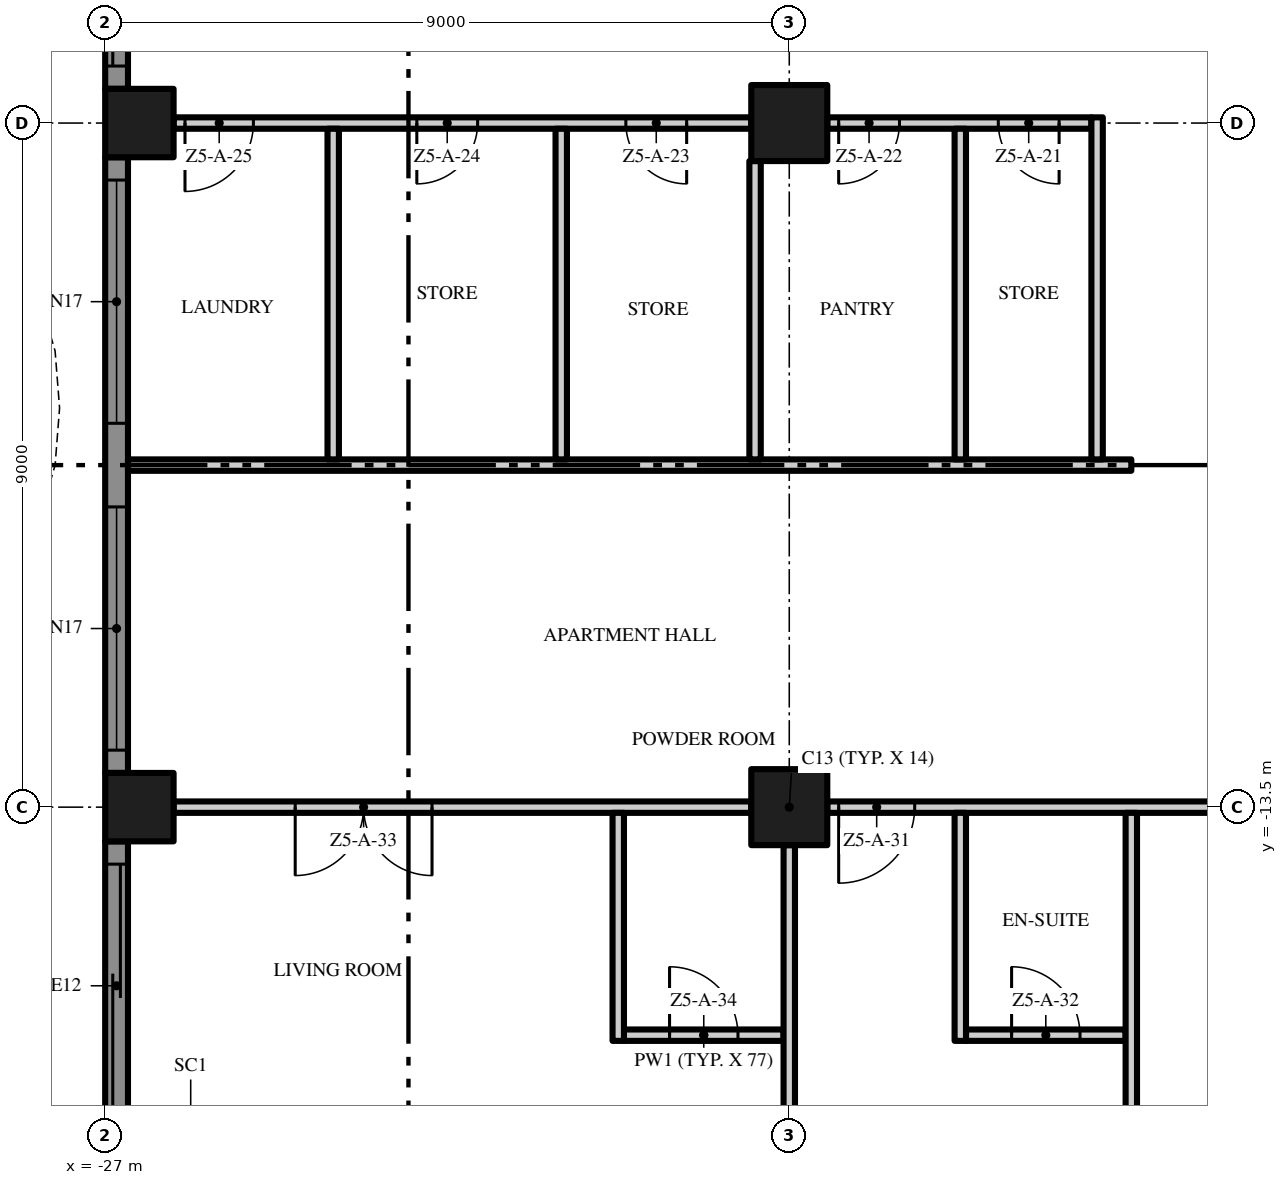
"""IFC4 building model, lengths in metres.
Left out: names, types, materials, properties, quantities, classifications, styles, units other than length and angle.
Written with IfcOpenShell. Run it as: python <this file> out.ifc"""

import sys

from ifc_helpers import new_model, si_unit, direction, frame, frame_2d, origin, origin_2d, place, context, subcontext, project, spatial, polyline, rectangle, outline, extrude, element, fill, save


model = new_model("IFC4")
c1 = context("Model", 3, precision=1e-05, world=origin(), true_north=direction((0.0, 1.0)))
c2 = subcontext(c1, "Body", "Model", "MODEL_VIEW")
j1 = project(units=[si_unit("LENGTHUNIT", "METRE"), si_unit("PLANEANGLEUNIT", "RADIAN")], contexts=[c1])
p1 = place(None, origin())
s1 = spatial("IfcSite", under=j1, at=p1, CompositionType="ELEMENT")
p2 = place(p1, origin())
s2 = spatial("IfcBuilding", under=s1, at=p2, CompositionType="ELEMENT")
p3 = place(p2, frame((0.0, 0.0, 242.6)))
s3 = spatial("IfcBuildingStorey", under=s2, at=p3, CompositionType="ELEMENT", Elevation=242.6)
for number, where, z_axis, x_axis in (
    (1, (-18.0, -13.5, 0.0), (0.0, 0.0, 1.0), (1.0, 0.0, 0.0)),
    (2, (-18.0, -4.5, 0.0), (0.0, 0.0, 1.0), (1.0, 0.0, 0.0)),
):
    element("IfcColumn", number, at=place(p3, frame(where, z_axis=z_axis, x_axis=x_axis)), inside=s3, PredefinedType="COLUMN", context=c2, shape_type="SweptSolid", body=[
        extrude(rectangle(XDim=1.0, YDim=1.0, at=origin_2d()), origin(), (0.0, 0.0, 1.0), 3.5),
    ])
for number, where, z_axis, x_axis in (
    (3, (-26.55, -13.5, 0.0), (0.0, 0.0, 1.0), (1.0, 0.0, 0.0)),
    (4, (-26.55, -4.5, 0.0), (0.0, 0.0, 1.0), (1.0, 0.0, 0.0)),
):
    element("IfcColumn", number, at=place(p3, frame(where, z_axis=z_axis, x_axis=x_axis)), inside=s3, PredefinedType="COLUMN", context=c2, shape_type="SweptSolid", body=[
        extrude(rectangle(XDim=0.9, YDim=0.9, at=origin_2d()), origin(), (0.0, 0.0, 1.0), 3.5),
    ])
p4 = place(p3, frame((-26.85, -4.05, 0.0), z_axis=(0.0, 0.0, 1.0), x_axis=(0.0, 1.0, 0.0)))
e5 = element("IfcWall", 5, at=p4, inside=s3, PredefinedType="SOLIDWALL", context=c2, shape_type="SweptSolid", body=[
    extrude(rectangle(XDim=8.1, YDim=0.3, at=frame_2d((4.05, 0.0))), origin(), (0.0, 0.0, 1.0), 3.5),
])
p5 = place(p4, frame((4.6, 0.0, 0.45)))
e6 = element("IfcOpeningElement", 6, at=p5, cuts=e5, PredefinedType="OPENING", context=c2, shape_type="SweptSolid", body=[
    extrude(rectangle(XDim=3.2, YDim=2.65, at=frame_2d((1.6, 1.325))), frame((0.0, 0.16, 0.0), z_axis=(0.0, -1.0, 0.0), x_axis=(1.0, 0.0, 0.0)), (0.0, 0.0, 1.0), 0.32),
])
p6 = place(p4, frame((0.3, 0.0, 0.0)))
e7 = element("IfcOpeningElement", 7, at=p6, cuts=e5, PredefinedType="OPENING", context=c2, shape_type="SweptSolid", body=[
    extrude(rectangle(XDim=3.2, YDim=2.4, at=frame_2d((1.6, 1.2))), frame((0.0, 0.16, 0.0), z_axis=(0.0, -1.0, 0.0), x_axis=(1.0, 0.0, 0.0)), (0.0, 0.0, 1.0), 0.32),
])
p7 = place(p3, frame((-26.85, -13.05, 0.0), z_axis=(0.0, 0.0, 1.0), x_axis=(0.0, 1.0, 0.0)))
e8 = element("IfcWall", 8, at=p7, inside=s3, PredefinedType="SOLIDWALL", context=c2, shape_type="SweptSolid", body=[
    extrude(rectangle(XDim=8.1, YDim=0.3, at=frame_2d((4.05, 0.0))), origin(), (0.0, 0.0, 1.0), 3.5),
])
p8 = place(p7, frame((4.6, 0.0, 0.45)))
e9 = element("IfcOpeningElement", 9, at=p8, cuts=e8, PredefinedType="OPENING", context=c2, shape_type="SweptSolid", body=[
    extrude(rectangle(XDim=3.2, YDim=2.65, at=frame_2d((1.6, 1.325))), frame((0.0, 0.16, 0.0), z_axis=(0.0, -1.0, 0.0), x_axis=(1.0, 0.0, 0.0)), (0.0, 0.0, 1.0), 0.32),
])
p9 = place(p7, frame((0.3, 0.0, 0.45)))
e10 = element("IfcOpeningElement", 10, at=p9, cuts=e8, PredefinedType="OPENING", context=c2, shape_type="SweptSolid", body=[
    extrude(rectangle(XDim=3.2, YDim=2.65, at=frame_2d((1.6, 1.325))), frame((0.0, 0.16, 0.0), z_axis=(0.0, -1.0, 0.0), x_axis=(1.0, 0.0, 0.0)), (0.0, 0.0, 1.0), 0.32),
])
p10 = place(p3, frame((-26.85, -18.0, 0.0), z_axis=(0.0, 0.0, 1.0), x_axis=(0.0, 1.0, 0.0)))
e11 = element("IfcWall", 11, at=p10, inside=s3, PredefinedType="SOLIDWALL", context=c2, shape_type="SweptSolid", body=[
    extrude(rectangle(XDim=4.05, YDim=0.3, at=frame_2d((2.025, 0.0))), origin(), (0.0, 0.0, 1.0), 3.5),
])
p11 = place(p10, frame((0.55, 0.0, 0.0)))
e12 = element("IfcOpeningElement", 12, at=p11, cuts=e11, PredefinedType="OPENING", context=c2, shape_type="SweptSolid", body=[
    extrude(rectangle(XDim=3.2, YDim=2.4, at=frame_2d((1.6, 1.2))), frame((0.0, 0.16, 0.0), z_axis=(0.0, -1.0, 0.0), x_axis=(1.0, 0.0, 0.0)), (0.0, 0.0, 1.0), 0.32),
])
p12 = place(p3, origin())
e13 = element("IfcWall", 13, at=p12, inside=s3, PredefinedType="USERDEFINED", context=c2, shape_type="SweptSolid", body=[
    extrude(outline(polyline([(-28.8, 18.0), (-29.505, 16.5), (-29.941, 15.0), (-30.0, 14.25), (-29.941, 13.5), (-29.505, 12.0), (-28.8, 10.5), (-28.095, 9.0), (-27.659, 7.5), (-27.6, 6.75), (-27.659, 6.0), (-28.095, 4.5), (-28.8, 3.0), (-29.505, 1.5), (-29.941, 0.0), (-30.0, -0.75), (-29.941, -1.5), (-29.505, -3.0), (-28.8, -4.5), (-28.095, -6.0), (-27.659, -7.5), (-27.6, -8.25), (-27.659, -9.0), (-28.095, -10.5), (-28.8, -12.0), (-29.505, -13.5), (-29.941, -15.0), (-30.0, -15.75), (-29.941, -16.5), (-29.505, -18.0), (-29.265, -17.93), (-29.694, -16.455), (-29.749, -15.75), (-29.694, -15.045), (-29.271, -13.589), (-28.574, -12.106), (-27.86, -10.589), (-27.411, -9.045), (-27.349, -8.25), (-27.411, -7.455), (-27.86, -5.911), (-28.574, -4.394), (-29.271, -2.911), (-29.694, -1.455), (-29.749, -0.75), (-29.694, -0.045), (-29.271, 1.411), (-28.574, 2.894), (-27.86, 4.411), (-27.411, 5.955), (-27.349, 6.75), (-27.411, 7.545), (-27.86, 9.089), (-28.574, 10.606), (-29.271, 12.089), (-29.694, 13.545), (-29.749, 14.25), (-29.694, 14.955), (-29.271, 16.411), (-28.574, 17.894), (-28.8, 18.0)])), origin(), (0.0, 0.0, 1.0), 0.9),
])
p13 = place(p3, frame((-20.175, -16.5, 0.0), z_axis=(0.0, 0.0, 1.0), x_axis=(1.0, 0.0, 0.0)))
e14 = element("IfcWall", 14, at=p13, inside=s3, PredefinedType="PARTITIONING", context=c2, shape_type="SweptSolid", body=[
    extrude(rectangle(XDim=2.1, YDim=0.15, at=frame_2d((1.05, 0.0))), origin(), (0.0, 0.0, 1.0), 3.5),
])
p14 = place(p13, frame((0.6, 0.0, 0.0)))
e15 = element("IfcOpeningElement", 15, at=p14, cuts=e14, PredefinedType="OPENING", context=c2, shape_type="SweptSolid", body=[
    extrude(rectangle(XDim=0.9, YDim=2.1, at=frame_2d((0.45, 1.05))), frame((0.0, 0.085, 0.0), z_axis=(0.0, -1.0, 0.0), x_axis=(1.0, 0.0, 0.0)), (0.0, 0.0, 1.0), 0.17),
])
p15 = place(p3, frame((-15.675, -16.5, 0.0), z_axis=(0.0, 0.0, 1.0), x_axis=(1.0, 0.0, 0.0)))
e16 = element("IfcWall", 16, at=p15, inside=s3, PredefinedType="PARTITIONING", context=c2, shape_type="SweptSolid", body=[
    extrude(rectangle(XDim=2.1, YDim=0.15, at=frame_2d((1.05, 0.0))), origin(), (0.0, 0.0, 1.0), 3.5),
])
p16 = place(p15, frame((0.6, 0.0, 0.0)))
e17 = element("IfcOpeningElement", 17, at=p16, cuts=e16, PredefinedType="OPENING", context=c2, shape_type="SweptSolid", body=[
    extrude(rectangle(XDim=0.9, YDim=2.1, at=frame_2d((0.45, 1.05))), frame((0.0, 0.085, 0.0), z_axis=(0.0, -1.0, 0.0), x_axis=(1.0, 0.0, 0.0)), (0.0, 0.0, 1.0), 0.17),
])
p17 = place(p3, frame((-18.5, -13.5, 0.0), z_axis=(0.0, 0.0, 1.0), x_axis=(-1.0, 0.0, 0.0)))
e18 = element("IfcWall", 18, at=p17, inside=s3, PredefinedType="PARTITIONING", context=c2, shape_type="SweptSolid", body=[
    extrude(rectangle(XDim=7.6, YDim=0.15, at=frame_2d((3.8, 0.0))), origin(), (0.0, 0.0, 1.0), 3.5),
])
p18 = place(p17, frame((4.2, 0.0, 0.0)))
e19 = element("IfcOpeningElement", 19, at=p18, cuts=e18, PredefinedType="OPENING", context=c2, shape_type="SweptSolid", body=[
    extrude(rectangle(XDim=1.8, YDim=2.4, at=frame_2d((0.9, 1.2))), frame((0.0, 0.085, 0.0), z_axis=(0.0, -1.0, 0.0), x_axis=(1.0, 0.0, 0.0)), (0.0, 0.0, 1.0), 0.17),
])
p19 = place(p3, frame((-9.5, -13.5, 0.0), z_axis=(0.0, 0.0, 1.0), x_axis=(-1.0, 0.0, 0.0)))
e20 = element("IfcWall", 20, at=p19, inside=s3, PredefinedType="PARTITIONING", context=c2, shape_type="SweptSolid", body=[
    extrude(rectangle(XDim=8.0, YDim=0.15, at=frame_2d((4.0, 0.0))), origin(), (0.0, 0.0, 1.0), 3.5),
])
p20 = place(p19, frame((1.25, 0.0, 0.0)))
e21 = element("IfcOpeningElement", 21, at=p20, cuts=e20, PredefinedType="OPENING", context=c2, shape_type="SweptSolid", body=[
    extrude(rectangle(XDim=1.0, YDim=2.4, at=frame_2d((0.5, 1.2))), frame((0.0, 0.085, 0.0), z_axis=(0.0, -1.0, 0.0), x_axis=(1.0, 0.0, 0.0)), (0.0, 0.0, 1.0), 0.17),
])
p21 = place(p19, frame((6.85, 0.0, 0.0)))
e22 = element("IfcOpeningElement", 22, at=p21, cuts=e20, PredefinedType="OPENING", context=c2, shape_type="SweptSolid", body=[
    extrude(rectangle(XDim=1.0, YDim=2.4, at=frame_2d((0.5, 1.2))), frame((0.0, 0.085, 0.0), z_axis=(0.0, -1.0, 0.0), x_axis=(1.0, 0.0, 0.0)), (0.0, 0.0, 1.0), 0.17),
])
p22 = place(p3, frame((-26.7, -9.0, 0.0), z_axis=(0.0, 0.0, 1.0), x_axis=(1.0, 0.0, 0.0)))
e23 = element("IfcWall", 23, at=p22, inside=s3, PredefinedType="PARTITIONING", context=c2, shape_type="SweptSolid", body=[
    extrude(rectangle(XDim=13.2, YDim=0.15, at=frame_2d((6.6, 0.0))), origin(), (0.0, 0.0, 1.0), 3.5),
])
p23 = place(p3, frame((-18.5, -4.5, 0.0), z_axis=(0.0, 0.0, 1.0), x_axis=(-1.0, 0.0, 0.0)))
e24 = element("IfcWall", 24, at=p23, inside=s3, PredefinedType="PARTITIONING", context=c2, shape_type="SweptSolid", body=[
    extrude(rectangle(XDim=7.6, YDim=0.15, at=frame_2d((3.8, 0.0))), origin(), (0.0, 0.0, 1.0), 3.5),
])
p24 = place(p23, frame((0.85, 0.0, 0.0)))
e25 = element("IfcOpeningElement", 25, at=p24, cuts=e24, PredefinedType="OPENING", context=c2, shape_type="SweptSolid", body=[
    extrude(rectangle(XDim=0.8, YDim=2.0, at=frame_2d((0.4, 1.0))), frame((0.0, 0.085, 0.0), z_axis=(0.0, -1.0, 0.0), x_axis=(1.0, 0.0, 0.0)), (0.0, 0.0, 1.0), 0.17),
])
p25 = place(p23, frame((3.6, 0.0, 0.0)))
e26 = element("IfcOpeningElement", 26, at=p25, cuts=e24, PredefinedType="OPENING", context=c2, shape_type="SweptSolid", body=[
    extrude(rectangle(XDim=0.8, YDim=2.0, at=frame_2d((0.4, 1.0))), frame((0.0, 0.085, 0.0), z_axis=(0.0, -1.0, 0.0), x_axis=(1.0, 0.0, 0.0)), (0.0, 0.0, 1.0), 0.17),
])
p26 = place(p23, frame((6.55, 0.0, 0.0)))
e27 = element("IfcOpeningElement", 27, at=p26, cuts=e24, PredefinedType="OPENING", context=c2, shape_type="SweptSolid", body=[
    extrude(rectangle(XDim=0.9, YDim=2.1, at=frame_2d((0.45, 1.05))), frame((0.0, 0.085, 0.0), z_axis=(0.0, -1.0, 0.0), x_axis=(1.0, 0.0, 0.0)), (0.0, 0.0, 1.0), 0.17),
])
p27 = place(p3, frame((-14.025, -4.5, 0.0), z_axis=(0.0, 0.0, 1.0), x_axis=(-1.0, 0.0, 0.0)))
e28 = element("IfcWall", 28, at=p27, inside=s3, PredefinedType="PARTITIONING", context=c2, shape_type="SweptSolid", body=[
    extrude(rectangle(XDim=3.475, YDim=0.15, at=frame_2d((1.738, 0.0))), origin(), (0.0, 0.0, 1.0), 3.5),
])
p28 = place(p27, frame((0.425, 0.0, 0.0)))
e29 = element("IfcOpeningElement", 29, at=p28, cuts=e28, PredefinedType="OPENING", context=c2, shape_type="SweptSolid", body=[
    extrude(rectangle(XDim=0.8, YDim=2.0, at=frame_2d((0.4, 1.0))), frame((0.0, 0.085, 0.0), z_axis=(0.0, -1.0, 0.0), x_axis=(1.0, 0.0, 0.0)), (0.0, 0.0, 1.0), 0.17),
])
p29 = place(p27, frame((2.525, 0.0, 0.0)))
e30 = element("IfcOpeningElement", 30, at=p29, cuts=e28, PredefinedType="OPENING", context=c2, shape_type="SweptSolid", body=[
    extrude(rectangle(XDim=0.8, YDim=2.0, at=frame_2d((0.4, 1.0))), frame((0.0, 0.085, 0.0), z_axis=(0.0, -1.0, 0.0), x_axis=(1.0, 0.0, 0.0)), (0.0, 0.0, 1.0), 0.17),
])
for number, where, z_axis, x_axis in (
    (31, (-24.0, -8.925, 0.0), (0.0, 0.0, 1.0), (0.0, 1.0, 0.0)),
    (32, (-21.0, -8.925, 0.0), (0.0, 0.0, 1.0), (0.0, 1.0, 0.0)),
):
    element("IfcWall", number, at=place(p3, frame(where, z_axis=z_axis, x_axis=x_axis)), inside=s3, PredefinedType="PARTITIONING", context=c2, shape_type="SweptSolid", body=[
        extrude(rectangle(XDim=4.35, YDim=0.15, at=frame_2d((2.175, 0.0))), origin(), (0.0, 0.0, 1.0), 3.5),
    ])
p30 = place(p3, frame((-20.25, -16.575, 0.0), z_axis=(0.0, 0.0, 1.0), x_axis=(0.0, 1.0, 0.0)))
e33 = element("IfcWall", 33, at=p30, inside=s3, PredefinedType="PARTITIONING", context=c2, shape_type="SweptSolid", body=[
    extrude(rectangle(XDim=3.0, YDim=0.15, at=frame_2d((1.5, 0.0))), origin(), (0.0, 0.0, 1.0), 3.5),
])
p31 = place(p3, frame((-18.45, -8.925, 0.0), z_axis=(0.0, 0.0, 1.0), x_axis=(0.0, 1.0, 0.0)))
e34 = element("IfcWall", 34, at=p31, inside=s3, PredefinedType="PARTITIONING", context=c2, shape_type="SweptSolid", body=[
    extrude(rectangle(XDim=3.925, YDim=0.15, at=frame_2d((1.962, 0.0))), origin(), (0.0, 0.0, 1.0), 3.5),
])
p32 = place(p3, frame((-18.0, -21.6, 0.0), z_axis=(0.0, 0.0, 1.0), x_axis=(0.0, 1.0, 0.0)))
e35 = element("IfcWall", 35, at=p32, inside=s3, PredefinedType="PARTITIONING", context=c2, shape_type="SweptSolid", body=[
    extrude(rectangle(XDim=7.6, YDim=0.15, at=frame_2d((3.8, 0.0))), origin(), (0.0, 0.0, 1.0), 3.5),
])
p33 = place(p3, frame((-15.75, -16.575, 0.0), z_axis=(0.0, 0.0, 1.0), x_axis=(0.0, 1.0, 0.0)))
e36 = element("IfcWall", 36, at=p33, inside=s3, PredefinedType="PARTITIONING", context=c2, shape_type="SweptSolid", body=[
    extrude(rectangle(XDim=3.0, YDim=0.15, at=frame_2d((1.5, 0.0))), origin(), (0.0, 0.0, 1.0), 3.5),
])
p34 = place(p3, frame((-15.75, -8.925, 0.0), z_axis=(0.0, 0.0, 1.0), x_axis=(0.0, 1.0, 0.0)))
e37 = element("IfcWall", 37, at=p34, inside=s3, PredefinedType="PARTITIONING", context=c2, shape_type="SweptSolid", body=[
    extrude(rectangle(XDim=4.35, YDim=0.15, at=frame_2d((2.175, 0.0))), origin(), (0.0, 0.0, 1.0), 3.5),
])
p35 = place(p3, frame((-13.95, -8.925, 0.0), z_axis=(0.0, 0.0, 1.0), x_axis=(0.0, 1.0, 0.0)))
e38 = element("IfcWall", 38, at=p35, inside=s3, PredefinedType="PARTITIONING", context=c2, shape_type="SweptSolid", body=[
    extrude(rectangle(XDim=4.5, YDim=0.15, at=frame_2d((2.25, 0.0))), origin(), (0.0, 0.0, 1.0), 3.5),
])
p36 = place(p3, frame((-13.5, -22.2, 0.0), z_axis=(0.0, 0.0, 1.0), x_axis=(0.0, 1.0, 0.0)))
e39 = element("IfcWall", 39, at=p36, inside=s3, PredefinedType="PARTITIONING", context=c2, shape_type="SweptSolid", body=[
    extrude(rectangle(XDim=8.625, YDim=0.15, at=frame_2d((4.312, 0.0))), origin(), (0.0, 0.0, 1.0), 3.5),
])
p37 = place(p6, origin())
e40 = element("IfcDoor", 40, at=p37, inside=s3, OperationType="SINGLE_SWING_LEFT", PredefinedType="DOOR", context=c2, shape_type="SweptSolid", body=[
    extrude(rectangle(XDim=3.2, YDim=2.4, at=frame_2d((1.6, 1.2))), frame((0.0, 0.025, 0.0), z_axis=(0.0, -1.0, 0.0), x_axis=(1.0, 0.0, 0.0)), (0.0, 0.0, 1.0), 0.05),
])
fill(e7, e40)
p38 = place(p8, origin())
e41 = element("IfcWindow", 41, at=p38, inside=s3, PartitioningType="SINGLE_PANEL", PredefinedType="WINDOW", context=c2, shape_type="SweptSolid", body=[
    extrude(rectangle(XDim=3.2, YDim=2.65, at=frame_2d((1.6, 1.325))), frame((0.0, 0.03, 0.0), z_axis=(0.0, -1.0, 0.0), x_axis=(1.0, 0.0, 0.0)), (0.0, 0.0, 1.0), 0.06),
])
fill(e9, e41)
p39 = place(p9, origin())
e42 = element("IfcWindow", 42, at=p39, inside=s3, PartitioningType="SINGLE_PANEL", PredefinedType="WINDOW", context=c2, shape_type="SweptSolid", body=[
    extrude(rectangle(XDim=3.2, YDim=2.65, at=frame_2d((1.6, 1.325))), frame((0.0, 0.03, 0.0), z_axis=(0.0, -1.0, 0.0), x_axis=(1.0, 0.0, 0.0)), (0.0, 0.0, 1.0), 0.06),
])
fill(e10, e42)
p40 = place(p11, origin())
e43 = element("IfcDoor", 43, at=p40, inside=s3, OperationType="SINGLE_SWING_LEFT", PredefinedType="DOOR", context=c2, shape_type="SweptSolid", body=[
    extrude(rectangle(XDim=3.2, YDim=2.4, at=frame_2d((1.6, 1.2))), frame((0.0, 0.025, 0.0), z_axis=(0.0, -1.0, 0.0), x_axis=(1.0, 0.0, 0.0)), (0.0, 0.0, 1.0), 0.05),
])
fill(e12, e43)
p41 = place(p28, origin())
e44 = element("IfcDoor", 44, at=p41, inside=s3, OperationType="SINGLE_SWING_LEFT", PredefinedType="DOOR", context=c2, shape_type="SweptSolid", body=[
    extrude(rectangle(XDim=0.8, YDim=2.0, at=frame_2d((0.4, 1.0))), frame((0.0, 0.025, 0.0), z_axis=(0.0, -1.0, 0.0), x_axis=(1.0, 0.0, 0.0)), (0.0, 0.0, 1.0), 0.05),
])
fill(e29, e44)
p42 = place(p29, origin())
e45 = element("IfcDoor", 45, at=p42, inside=s3, OperationType="SINGLE_SWING_RIGHT", PredefinedType="DOOR", context=c2, shape_type="SweptSolid", body=[
    extrude(rectangle(XDim=0.8, YDim=2.0, at=frame_2d((0.4, 1.0))), frame((0.0, 0.025, 0.0), z_axis=(0.0, -1.0, 0.0), x_axis=(1.0, 0.0, 0.0)), (0.0, 0.0, 1.0), 0.05),
])
fill(e30, e45)
p43 = place(p24, origin())
e46 = element("IfcDoor", 46, at=p43, inside=s3, OperationType="SINGLE_SWING_LEFT", PredefinedType="DOOR", context=c2, shape_type="SweptSolid", body=[
    extrude(rectangle(XDim=0.8, YDim=2.0, at=frame_2d((0.4, 1.0))), frame((0.0, 0.025, 0.0), z_axis=(0.0, -1.0, 0.0), x_axis=(1.0, 0.0, 0.0)), (0.0, 0.0, 1.0), 0.05),
])
fill(e25, e46)
p44 = place(p25, origin())
e47 = element("IfcDoor", 47, at=p44, inside=s3, OperationType="SINGLE_SWING_RIGHT", PredefinedType="DOOR", context=c2, shape_type="SweptSolid", body=[
    extrude(rectangle(XDim=0.8, YDim=2.0, at=frame_2d((0.4, 1.0))), frame((0.0, 0.025, 0.0), z_axis=(0.0, -1.0, 0.0), x_axis=(1.0, 0.0, 0.0)), (0.0, 0.0, 1.0), 0.05),
])
fill(e26, e47)
p45 = place(p26, origin())
e48 = element("IfcDoor", 48, at=p45, inside=s3, OperationType="SINGLE_SWING_RIGHT", PredefinedType="DOOR", context=c2, shape_type="SweptSolid", body=[
    extrude(rectangle(XDim=0.9, YDim=2.1, at=frame_2d((0.45, 1.05))), frame((0.0, 0.025, 0.0), z_axis=(0.0, -1.0, 0.0), x_axis=(1.0, 0.0, 0.0)), (0.0, 0.0, 1.0), 0.05),
])
fill(e27, e48)
p46 = place(p21, origin())
e49 = element("IfcDoor", 49, at=p46, inside=s3, OperationType="SINGLE_SWING_RIGHT", PredefinedType="DOOR", context=c2, shape_type="SweptSolid", body=[
    extrude(rectangle(XDim=1.0, YDim=2.4, at=frame_2d((0.5, 1.2))), frame((0.0, 0.025, 0.0), z_axis=(0.0, -1.0, 0.0), x_axis=(1.0, 0.0, 0.0)), (0.0, 0.0, 1.0), 0.05),
])
fill(e22, e49)
p47 = place(p16, origin())
e50 = element("IfcDoor", 50, at=p47, inside=s3, OperationType="SINGLE_SWING_LEFT", PredefinedType="DOOR", context=c2, shape_type="SweptSolid", body=[
    extrude(rectangle(XDim=0.9, YDim=2.1, at=frame_2d((0.45, 1.05))), frame((0.0, 0.025, 0.0), z_axis=(0.0, -1.0, 0.0), x_axis=(1.0, 0.0, 0.0)), (0.0, 0.0, 1.0), 0.05),
])
fill(e17, e50)
p48 = place(p18, origin())
e51 = element("IfcDoor", 51, at=p48, inside=s3, OperationType="DOUBLE_DOOR_SINGLE_SWING", PredefinedType="DOOR", context=c2, shape_type="SweptSolid", body=[
    extrude(rectangle(XDim=1.8, YDim=2.4, at=frame_2d((0.9, 1.2))), frame((0.0, 0.025, 0.0), z_axis=(0.0, -1.0, 0.0), x_axis=(1.0, 0.0, 0.0)), (0.0, 0.0, 1.0), 0.05),
])
fill(e19, e51)
p49 = place(p14, origin())
e52 = element("IfcDoor", 52, at=p49, inside=s3, OperationType="SINGLE_SWING_LEFT", PredefinedType="DOOR", context=c2, shape_type="SweptSolid", body=[
    extrude(rectangle(XDim=0.9, YDim=2.1, at=frame_2d((0.45, 1.05))), frame((0.0, 0.025, 0.0), z_axis=(0.0, -1.0, 0.0), x_axis=(1.0, 0.0, 0.0)), (0.0, 0.0, 1.0), 0.05),
])
fill(e15, e52)
save(model, sys.argv[1])
